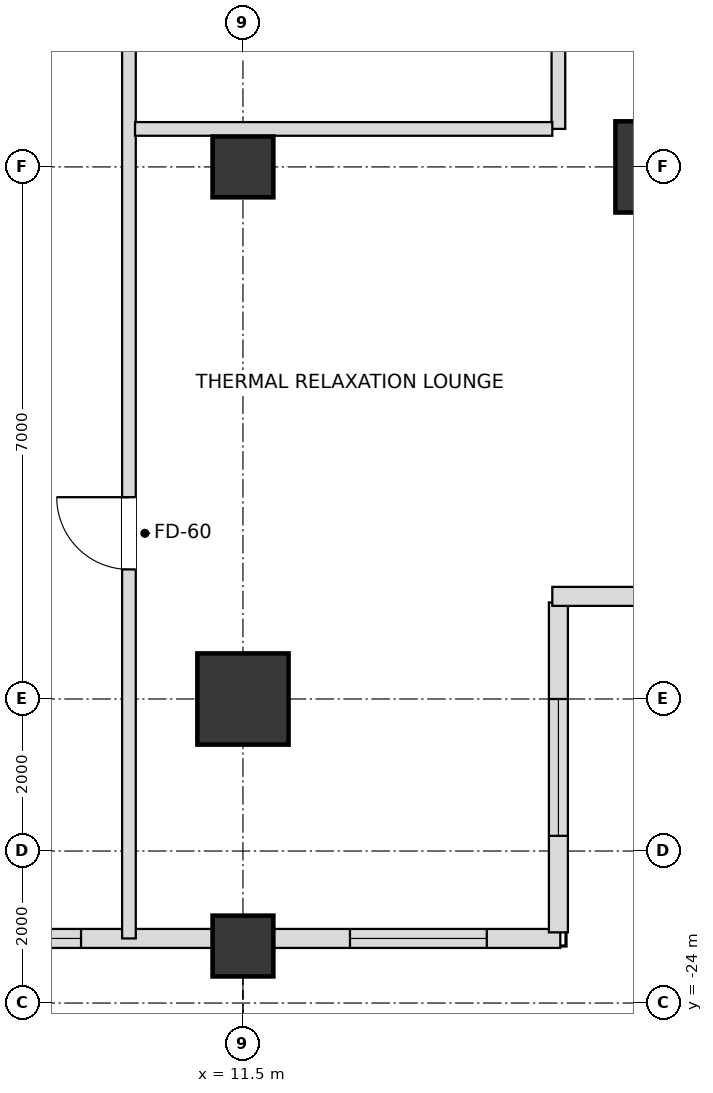
"""IFC4 building model, lengths in metres.
Left out: names, types, materials, properties, quantities, classifications, styles, units other than length and angle.
Written with IfcOpenShell. Run it as: python <this file> out.ifc"""

import sys

from ifc_helpers import new_model, si_unit, direction, frame, frame_2d, origin, origin_2d, place, context, subcontext, project, spatial, rectangle, extrude, element, fill, save


model = new_model("IFC4")
c1 = context("Model", 3, precision=1e-05, world=origin(), true_north=direction((0.0, 1.0)))
c2 = subcontext(c1, "Body", "Model", "MODEL_VIEW")
j1 = project(units=[si_unit("LENGTHUNIT", "METRE"), si_unit("PLANEANGLEUNIT", "RADIAN")], contexts=[c1])
p1 = place(None, origin())
s1 = spatial("IfcSite", under=j1, at=p1, CompositionType="ELEMENT")
p2 = place(p1, origin())
s2 = spatial("IfcBuilding", under=s1, at=p2, CompositionType="ELEMENT")
p3 = place(p2, frame((0.0, 0.0, 109.8)))
s3 = spatial("IfcBuildingStorey", under=s2, at=p3, CompositionType="ELEMENT", Elevation=109.8)
for number, where, z_axis, x_axis in (
    (1, (11.5, -20.0, 0.0), (0.0, 0.0, 1.0), (1.0, 0.0, 0.0)),
    (2, (17.0, -13.0, 0.0), (0.0, 0.0, 1.0), (1.0, 0.0, 0.0)),
):
    element("IfcColumn", number, at=place(p3, frame(where, z_axis=z_axis, x_axis=x_axis)), inside=s3, PredefinedType="USERDEFINED", context=c2, shape_type="SweptSolid", body=[
        extrude(rectangle(XDim=1.2, YDim=1.2, at=origin_2d()), origin(), (0.0, 0.0, 1.0), 3.6),
    ])
for number, where, z_axis, x_axis in (
    (3, (11.5, -13.0, 0.0), (0.0, 0.0, 1.0), (1.0, 0.0, 0.0)),
    (4, (11.5, -23.25, 0.0), (0.0, 0.0, 1.0), (1.0, 0.0, 0.0)),
):
    element("IfcColumn", number, at=place(p3, frame(where, z_axis=z_axis, x_axis=x_axis)), inside=s3, PredefinedType="COLUMN", context=c2, shape_type="SweptSolid", body=[
        extrude(rectangle(XDim=0.8, YDim=0.8, at=origin_2d()), origin(), (0.0, 0.0, 1.0), 3.6),
    ])
p4 = place(p3, frame((6.895, -23.15, 0.0), z_axis=(0.0, 0.0, 1.0), x_axis=(1.0, 0.0, 0.0)))
e5 = element("IfcWall", 5, at=p4, inside=s3, PredefinedType="SOLIDWALL", context=c2, shape_type="SweptSolid", body=[
    extrude(rectangle(XDim=4.21, YDim=0.25, at=frame_2d((2.105, 0.0))), origin(), (0.0, 0.0, 1.0), 2.736),
])
p5 = place(p4, frame((0.675, 0.0, 0.72)))
e6 = element("IfcOpeningElement", 6, at=p5, cuts=e5, PredefinedType="OPENING", context=c2, shape_type="SweptSolid", body=[
    extrude(rectangle(XDim=1.8, YDim=1.68, at=frame_2d((0.9, 0.84))), frame((0.0, 0.135, 0.0), z_axis=(0.0, -1.0, 0.0), x_axis=(1.0, 0.0, 0.0)), (0.0, 0.0, 1.0), 0.27),
])
p6 = place(p3, frame((11.895, -23.15, 0.0), z_axis=(0.0, 0.0, 1.0), x_axis=(1.0, 0.0, 0.0)))
e7 = element("IfcWall", 7, at=p6, inside=s3, PredefinedType="SOLIDWALL", context=c2, shape_type="SweptSolid", body=[
    extrude(rectangle(XDim=3.78, YDim=0.25, at=frame_2d((1.89, 0.0))), origin(), (0.0, 0.0, 1.0), 2.736),
])
p7 = place(p6, frame((1.013, 0.0, 0.72)))
e8 = element("IfcOpeningElement", 8, at=p7, cuts=e7, PredefinedType="OPENING", context=c2, shape_type="SweptSolid", body=[
    extrude(rectangle(XDim=1.8, YDim=1.68, at=frame_2d((0.9, 0.84))), frame((0.0, 0.135, 0.0), z_axis=(0.0, -1.0, 0.0), x_axis=(1.0, 0.0, 0.0)), (0.0, 0.0, 1.0), 0.27),
])
p8 = place(p3, frame((15.65, -23.07, 0.0), z_axis=(0.0, 0.0, 1.0), x_axis=(0.0, 1.0, 0.0)))
e9 = element("IfcWall", 9, at=p8, inside=s3, PredefinedType="SOLIDWALL", context=c2, shape_type="SweptSolid", body=[
    extrude(rectangle(XDim=4.34, YDim=0.25, at=frame_2d((2.17, 0.0))), origin(), (0.0, 0.0, 1.0), 2.736),
])
p9 = place(p8, frame((1.27, 0.0, 0.72)))
e10 = element("IfcOpeningElement", 10, at=p9, cuts=e9, PredefinedType="OPENING", context=c2, shape_type="SweptSolid", body=[
    extrude(rectangle(XDim=1.8, YDim=1.68, at=frame_2d((0.9, 0.84))), frame((0.0, 0.135, 0.0), z_axis=(0.0, -1.0, 0.0), x_axis=(1.0, 0.0, 0.0)), (0.0, 0.0, 1.0), 0.27),
])
p10 = place(p3, frame((15.57, -18.65, 0.0), z_axis=(0.0, 0.0, 1.0), x_axis=(1.0, 0.0, 0.0)))
e11 = element("IfcWall", 11, at=p10, inside=s3, PredefinedType="SOLIDWALL", context=c2, shape_type="SweptSolid", body=[
    extrude(rectangle(XDim=4.66, YDim=0.25, at=frame_2d((2.33, 0.0))), origin(), (0.0, 0.0, 1.0), 2.736),
])
p11 = place(p10, frame((1.43, 0.0, 0.72)))
e12 = element("IfcOpeningElement", 12, at=p11, cuts=e11, PredefinedType="OPENING", context=c2, shape_type="SweptSolid", body=[
    extrude(rectangle(XDim=1.8, YDim=1.68, at=frame_2d((0.9, 0.84))), frame((0.0, 0.135, 0.0), z_axis=(0.0, -1.0, 0.0), x_axis=(1.0, 0.0, 0.0)), (0.0, 0.0, 1.0), 0.27),
])
p12 = place(p3, frame((10.0, -23.15, 0.0), z_axis=(0.0, 0.0, 1.0), x_axis=(0.0, 1.0, 0.0)))
e13 = element("IfcWall", 13, at=p12, inside=s3, PredefinedType="PARTITIONING", context=c2, shape_type="SweptSolid", body=[
    extrude(rectangle(XDim=13.85, YDim=0.18, at=frame_2d((6.925, 0.0))), origin(), (0.0, 0.0, 1.0), 2.816),
])
p13 = place(p12, frame((4.855, 0.0, 0.0)))
e14 = element("IfcOpeningElement", 14, at=p13, cuts=e13, PredefinedType="OPENING", context=c2, shape_type="SweptSolid", body=[
    extrude(rectangle(XDim=0.95, YDim=2.15, at=frame_2d((0.475, 1.075))), frame((0.0, 0.1, 0.0), z_axis=(0.0, -1.0, 0.0), x_axis=(1.0, 0.0, 0.0)), (0.0, 0.0, 1.0), 0.2),
])
p14 = place(p3, frame((15.65, -12.5, 0.0), z_axis=(0.0, 0.0, 1.0), x_axis=(0.0, 1.0, 0.0)))
e15 = element("IfcWall", 15, at=p14, inside=s3, PredefinedType="PARTITIONING", context=c2, shape_type="SweptSolid", body=[
    extrude(rectangle(XDim=3.2, YDim=0.18, at=frame_2d((1.6, 0.0))), origin(), (0.0, 0.0, 1.0), 3.38),
])
p15 = place(p3, frame((10.08, -12.5, 0.0), z_axis=(0.0, 0.0, 1.0), x_axis=(1.0, 0.0, 0.0)))
e16 = element("IfcWall", 16, at=p15, inside=s3, PredefinedType="PARTITIONING", context=c2, shape_type="SweptSolid", body=[
    extrude(rectangle(XDim=5.49, YDim=0.18, at=frame_2d((2.745, 0.0))), origin(), (0.0, 0.0, 1.0), 3.38),
])
p16 = place(p5, origin())
e17 = element("IfcWindow", 17, at=p16, inside=s3, PartitioningType="SINGLE_PANEL", PredefinedType="WINDOW", context=c2, shape_type="SweptSolid", body=[
    extrude(rectangle(XDim=1.8, YDim=1.68, at=frame_2d((0.9, 0.84))), frame((0.0, 0.03, 0.0), z_axis=(0.0, -1.0, 0.0), x_axis=(1.0, 0.0, 0.0)), (0.0, 0.0, 1.0), 0.06),
])
fill(e6, e17)
p17 = place(p7, origin())
e18 = element("IfcWindow", 18, at=p17, inside=s3, PartitioningType="SINGLE_PANEL", PredefinedType="WINDOW", context=c2, shape_type="SweptSolid", body=[
    extrude(rectangle(XDim=1.8, YDim=1.68, at=frame_2d((0.9, 0.84))), frame((0.0, 0.03, 0.0), z_axis=(0.0, -1.0, 0.0), x_axis=(1.0, 0.0, 0.0)), (0.0, 0.0, 1.0), 0.06),
])
fill(e8, e18)
p18 = place(p9, origin())
e19 = element("IfcWindow", 19, at=p18, inside=s3, PartitioningType="SINGLE_PANEL", PredefinedType="WINDOW", context=c2, shape_type="SweptSolid", body=[
    extrude(rectangle(XDim=1.8, YDim=1.68, at=frame_2d((0.9, 0.84))), frame((0.0, 0.03, 0.0), z_axis=(0.0, -1.0, 0.0), x_axis=(1.0, 0.0, 0.0)), (0.0, 0.0, 1.0), 0.06),
])
fill(e10, e19)
p19 = place(p13, origin())
e20 = element("IfcDoor", 20, at=p19, inside=s3, OperationType="SINGLE_SWING_RIGHT", PredefinedType="DOOR", context=c2, shape_type="SweptSolid", body=[
    extrude(rectangle(XDim=0.95, YDim=2.15, at=frame_2d((0.475, 1.075))), frame((0.0, 0.025, 0.0), z_axis=(0.0, -1.0, 0.0), x_axis=(1.0, 0.0, 0.0)), (0.0, 0.0, 1.0), 0.05),
])
fill(e14, e20)
save(model, sys.argv[1])
